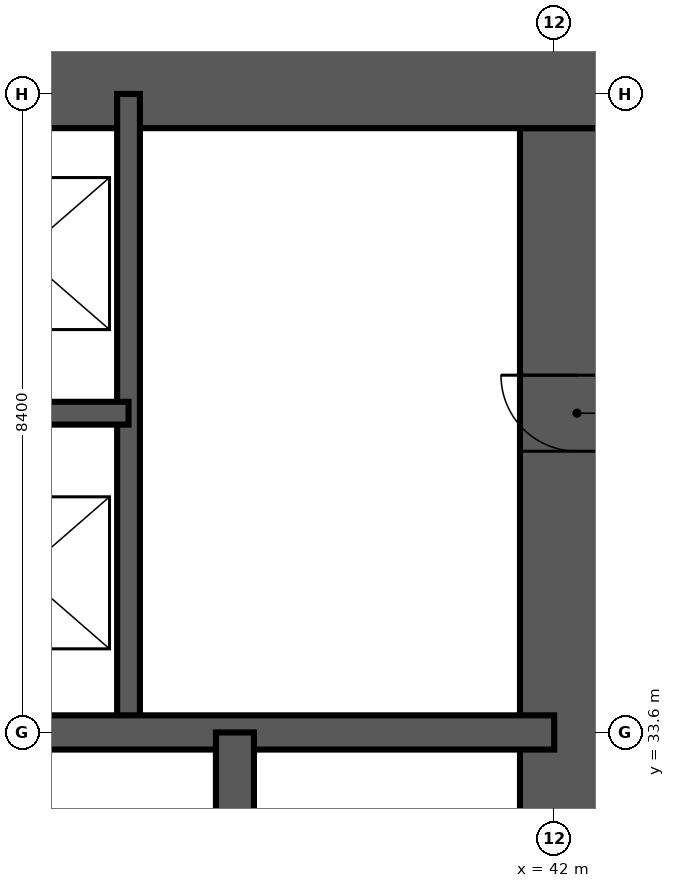
"""IFC4 building model, lengths in metres.
Left out: names, types, materials, properties, quantities, classifications, styles, units other than length and angle.
Written with IfcOpenShell. Run it as: python <this file> out.ifc"""

import sys

from ifc_helpers import new_model, si_unit, direction, frame, frame_2d, origin, place, context, subcontext, project, spatial, rectangle, extrude, element, fill, save


model = new_model("IFC4")
c1 = context("Model", 3, precision=1e-05, world=origin(), true_north=direction((0.0, 1.0)))
c2 = subcontext(c1, "Body", "Model", "MODEL_VIEW")
j1 = project(units=[si_unit("LENGTHUNIT", "METRE"), si_unit("PLANEANGLEUNIT", "RADIAN")], contexts=[c1])
p1 = place(None, origin())
s1 = spatial("IfcSite", under=j1, at=p1, CompositionType="ELEMENT")
p2 = place(p1, origin())
s2 = spatial("IfcBuilding", under=s1, at=p2, CompositionType="ELEMENT")
p3 = place(p2, frame((0.0, 0.0, 63.0)))
s3 = spatial("IfcBuildingStorey", under=s2, at=p3, CompositionType="ELEMENT", Elevation=63.0)
p4 = place(p3, frame((42.3, 17.25, -0.35), z_axis=(0.0, 0.0, 1.0), x_axis=(0.0, 1.0, 0.0)))
e1 = element("IfcWall", 1, at=p4, inside=s3, PredefinedType="SHEAR", context=c2, shape_type="SweptSolid", body=[
    extrude(rectangle(XDim=24.3, YDim=1.5, at=frame_2d((12.15, 0.0))), origin(), (0.0, 0.0, 1.0), 3.6),
])
p5 = place(p4, frame((0.35, 0.0, 0.35)))
e2 = element("IfcOpeningElement", 2, at=p5, cuts=e1, PredefinedType="OPENING", context=c2, shape_type="SweptSolid", body=[
    extrude(rectangle(XDim=1.2, YDim=2.2, at=frame_2d((0.6, 1.1))), frame((0.0, 0.76, 0.0), z_axis=(0.0, -1.0, 0.0), x_axis=(1.0, 0.0, 0.0)), (0.0, 0.0, 1.0), 1.52),
])
p6 = place(p4, frame((11.65, 0.0, 0.35)))
e3 = element("IfcOpeningElement", 3, at=p6, cuts=e1, PredefinedType="OPENING", context=c2, shape_type="SweptSolid", body=[
    extrude(rectangle(XDim=1.0, YDim=2.1, at=frame_2d((0.5, 1.05))), frame((0.0, 0.76, 0.0), z_axis=(0.0, -1.0, 0.0), x_axis=(1.0, 0.0, 0.0)), (0.0, 0.0, 1.0), 1.52),
])
p7 = place(p4, frame((20.05, 0.0, 0.35)))
e4 = element("IfcOpeningElement", 4, at=p7, cuts=e1, PredefinedType="OPENING", context=c2, shape_type="SweptSolid", body=[
    extrude(rectangle(XDim=1.0, YDim=2.1, at=frame_2d((0.5, 1.05))), frame((0.0, 0.76, 0.0), z_axis=(0.0, -1.0, 0.0), x_axis=(1.0, 0.0, 0.0)), (0.0, 0.0, 1.0), 1.52),
])
p8 = place(p3, frame((43.05, 42.3, -0.35), z_axis=(0.0, 0.0, 1.0), x_axis=(-1.0, 0.0, 0.0)))
e5 = element("IfcWall", 5, at=p8, inside=s3, PredefinedType="SHEAR", context=c2, shape_type="SweptSolid", body=[
    extrude(rectangle(XDim=27.3, YDim=1.5, at=frame_2d((13.65, 0.0))), origin(), (0.0, 0.0, 1.0), 3.6),
])
p9 = place(p8, frame((21.55, 0.0, 0.35)))
e6 = element("IfcOpeningElement", 6, at=p9, cuts=e5, PredefinedType="OPENING", context=c2, shape_type="SweptSolid", body=[
    extrude(rectangle(XDim=1.0, YDim=2.1, at=frame_2d((0.5, 1.05))), frame((0.0, 0.76, 0.0), z_axis=(0.0, -1.0, 0.0), x_axis=(1.0, 0.0, 0.0)), (0.0, 0.0, 1.0), 1.52),
])
p10 = place(p8, frame((10.95, 0.0, 0.35)))
e7 = element("IfcOpeningElement", 7, at=p10, cuts=e5, PredefinedType="OPENING", context=c2, shape_type="SweptSolid", body=[
    extrude(rectangle(XDim=1.2, YDim=2.2, at=frame_2d((0.6, 1.1))), frame((0.0, 0.76, 0.0), z_axis=(0.0, -1.0, 0.0), x_axis=(1.0, 0.0, 0.0)), (0.0, 0.0, 1.0), 1.52),
])
p11 = place(p3, frame((36.4, 33.6, -0.35), z_axis=(0.0, 0.0, 1.0), x_axis=(0.0, 1.0, 0.0)))
e8 = element("IfcWall", 8, at=p11, inside=s3, PredefinedType="SHEAR", context=c2, shape_type="SweptSolid", body=[
    extrude(rectangle(XDim=8.4, YDim=0.3, at=frame_2d((4.2, 0.0))), origin(), (0.0, 0.0, 1.0), 3.6),
])
p12 = place(p3, frame((33.6, 37.8, -0.35), z_axis=(0.0, 0.0, 1.0), x_axis=(1.0, 0.0, 0.0)))
e9 = element("IfcWall", 9, at=p12, inside=s3, PredefinedType="SHEAR", context=c2, shape_type="SweptSolid", body=[
    extrude(rectangle(XDim=2.8, YDim=0.3, at=frame_2d((1.4, 0.0))), origin(), (0.0, 0.0, 1.0), 3.6),
])
p13 = place(p3, frame((16.8, 33.6, -0.35), z_axis=(0.0, 0.0, 1.0), x_axis=(1.0, 0.0, 0.0)))
e10 = element("IfcWall", 10, at=p13, inside=s3, PredefinedType="SHEAR", context=c2, shape_type="SweptSolid", body=[
    extrude(rectangle(XDim=25.2, YDim=0.45, at=frame_2d((12.6, 0.0))), origin(), (0.0, 0.0, 1.0), 3.6),
])
p14 = place(p3, frame((37.8, 30.8, -0.35), z_axis=(0.0, 0.0, 1.0), x_axis=(0.0, 1.0, 0.0)))
e11 = element("IfcWall", 11, at=p14, inside=s3, PredefinedType="SHEAR", context=c2, shape_type="SweptSolid", body=[
    extrude(rectangle(XDim=2.8, YDim=0.5, at=frame_2d((1.4, 0.0))), origin(), (0.0, 0.0, 1.0), 3.6),
])
p15 = place(p7, origin())
e12 = element("IfcDoor", 12, at=p15, inside=s3, OperationType="SINGLE_SWING_RIGHT", PredefinedType="DOOR", context=c2, shape_type="SweptSolid", body=[
    extrude(rectangle(XDim=1.0, YDim=2.1, at=frame_2d((0.5, 1.05))), frame((0.0, 0.025, 0.0), z_axis=(0.0, -1.0, 0.0), x_axis=(1.0, 0.0, 0.0)), (0.0, 0.0, 1.0), 0.05),
])
fill(e4, e12)
save(model, sys.argv[1])
